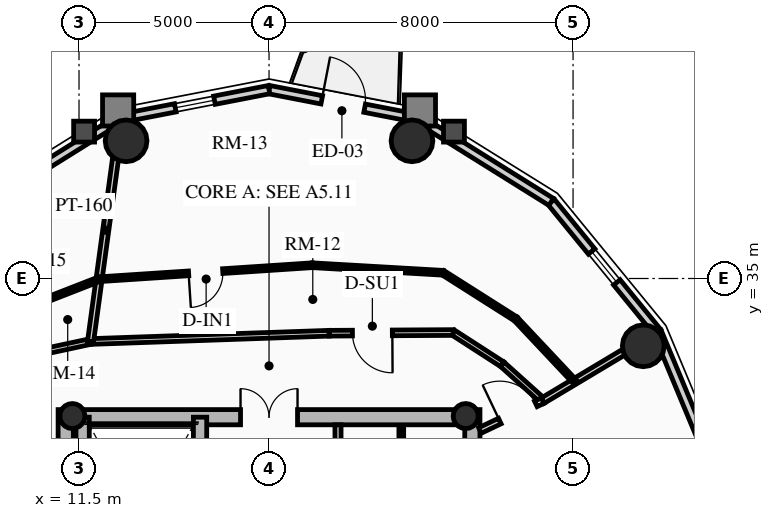
"""IFC4 building model, lengths in metres.
Left out: names, types, materials, properties, quantities, classifications, styles, units other than length and angle.
Written with IfcOpenShell. Run it as: python <this file> out.ifc"""

import sys

from ifc_helpers import new_model, si_unit, direction, frame, frame_2d, origin, origin_2d, place, context, subcontext, project, spatial, rectangle, circle, hollow_circle, extrude, source, transform, mapped, element, fill, save


model = new_model("IFC4")
c1 = context("Model", 3, precision=1e-05, world=origin(), true_north=direction((0.0, 1.0)))
c2 = subcontext(c1, "Body", "Model", "MODEL_VIEW")
j1 = project(units=[si_unit("LENGTHUNIT", "METRE"), si_unit("PLANEANGLEUNIT", "RADIAN")], contexts=[c1])
p1 = place(None, origin())
s1 = spatial("IfcSite", under=j1, at=p1, CompositionType="ELEMENT")
p2 = place(p1, origin())
s2 = spatial("IfcBuilding", under=s1, at=p2, CompositionType="ELEMENT")
p3 = place(p2, frame((0.0, 0.0, 226.05)))
s3 = spatial("IfcBuildingStorey", under=s2, at=p3, CompositionType="ELEMENT", Elevation=226.05)
for number, where, z_axis, x_axis in (
    (1, (11.15, 17.45, 0.0), (0.0, 0.0, 1.0), (0.0, 1.0, 0.0)),
    (2, (21.85, 17.45, 0.0), (0.0, 0.0, 1.0), (0.0, 1.0, 0.0)),
):
    element("IfcWall", number, at=place(p3, frame(where, z_axis=z_axis, x_axis=x_axis)), inside=s3, PredefinedType="SHEAR", context=c2, shape_type="SweptSolid", body=[
        extrude(rectangle(XDim=14.1, YDim=0.4, at=frame_2d((7.05, 0.0))), origin(), (0.0, 0.0, 1.0), 3.2),
    ])
p4 = place(p3, frame((11.15, 31.35, 0.0), z_axis=(0.0, 0.0, 1.0), x_axis=(1.0, 0.0, 0.0)))
e3 = element("IfcWall", 3, at=p4, inside=s3, PredefinedType="SHEAR", context=c2, shape_type="SweptSolid", body=[
    extrude(rectangle(XDim=10.7, YDim=0.4, at=frame_2d((5.35, 0.0))), origin(), (0.0, 0.0, 1.0), 3.2),
])
m1 = source(origin(), c2, "Body", "SweptSolid", [
    extrude(rectangle(XDim=1.5, YDim=2.02, at=frame_2d((0.75, 1.01))), frame((0.0, 0.21, 0.0), z_axis=(0.0, -1.0, 0.0), x_axis=(1.0, 0.0, 0.0)), (0.0, 0.0, 1.0), 0.42),
])
p5 = place(p4, frame((4.6, 0.0, 0.0)))
e4 = element("IfcOpeningElement", 4, at=p5, cuts=e3, PredefinedType="OPENING", context=c2, shape_type="MappedRepresentation", body=[
    mapped(m1, transform((0.0, 0.0, 0.0), x_axis=(1.0, 0.0, 0.0), y_axis=(0.0, 1.0, 0.0), z_axis=(0.0, 0.0, 1.0), scale=1.0)),
])
p6 = place(p3, frame((14.685, 17.65, 0.0), z_axis=(0.0, 0.0, 1.0), x_axis=(0.0, 1.0, 0.0)))
e5 = element("IfcWall", 5, at=p6, inside=s3, PredefinedType="SHEAR", context=c2, shape_type="SweptSolid", body=[
    extrude(rectangle(XDim=13.7, YDim=0.35, at=frame_2d((6.85, 0.0))), origin(), (0.0, 0.0, 1.0), 3.2),
])
m2 = source(origin(), c2, "Body", "SweptSolid", [
    extrude(rectangle(XDim=1.1, YDim=2.015, at=frame_2d((0.55, 1.007))), frame((0.0, 0.185, 0.0), z_axis=(0.0, -1.0, 0.0), x_axis=(1.0, 0.0, 0.0)), (0.0, 0.0, 1.0), 0.37),
])
p7 = place(p6, frame((4.85, 0.0, 0.0)))
e6 = element("IfcOpeningElement", 6, at=p7, cuts=e5, PredefinedType="OPENING", context=c2, shape_type="MappedRepresentation", body=[
    mapped(m2, transform((0.0, 0.0, 0.0), x_axis=(1.0, 0.0, 0.0), y_axis=(0.0, 1.0, 0.0), z_axis=(0.0, 0.0, 1.0), scale=1.0)),
])
p8 = place(p6, frame((0.625, 0.0, 0.0)))
e7 = element("IfcOpeningElement", 7, at=p8, cuts=e5, PredefinedType="OPENING", context=c2, shape_type="MappedRepresentation", body=[
    mapped(m2, transform((0.0, 0.0, 0.0), x_axis=(1.0, 0.0, 0.0), y_axis=(0.0, 1.0, 0.0), z_axis=(0.0, 0.0, 1.0), scale=1.0)),
])
p9 = place(p6, frame((2.625, 0.0, 0.0)))
e8 = element("IfcOpeningElement", 8, at=p9, cuts=e5, PredefinedType="OPENING", context=c2, shape_type="MappedRepresentation", body=[
    mapped(m2, transform((0.0, 0.0, 0.0), x_axis=(1.0, 0.0, 0.0), y_axis=(0.0, 1.0, 0.0), z_axis=(0.0, 0.0, 1.0), scale=1.0)),
])
m3 = source(origin(), c2, "Body", "SweptSolid", [
    extrude(rectangle(XDim=1.15, YDim=2.02, at=frame_2d((0.575, 1.01))), frame((0.0, 0.185, 0.0), z_axis=(0.0, -1.0, 0.0), x_axis=(1.0, 0.0, 0.0)), (0.0, 0.0, 1.0), 0.37),
])
p10 = place(p6, frame((7.27, 0.0, 0.0)))
e9 = element("IfcOpeningElement", 9, at=p10, cuts=e5, PredefinedType="OPENING", context=c2, shape_type="MappedRepresentation", body=[
    mapped(m3, transform((0.0, 0.0, 0.0), x_axis=(1.0, 0.0, 0.0), y_axis=(0.0, 1.0, 0.0), z_axis=(0.0, 0.0, 1.0), scale=1.0)),
])
p11 = place(p3, frame((11.595, 24.655, 0.0), z_axis=(0.0, 0.0, 1.0), x_axis=(0.0, 1.0, 0.0)))
e10 = element("IfcWall", 10, at=p11, inside=s3, PredefinedType="SHEAR", context=c2, shape_type="SweptSolid", body=[
    extrude(rectangle(XDim=6.695, YDim=0.35, at=frame_2d((3.348, 0.0))), origin(), (0.0, 0.0, 1.0), 3.2),
])
for number, where, z_axis, x_axis in (
    (11, (11.325, 31.38, 0.0), (0.0, 0.0, 1.0), (1.0, 0.0, 0.0)),
    (12, (21.675, 31.38, 0.0), (0.0, 0.0, 1.0), (1.0, 0.0, 0.0)),
):
    element("IfcColumn", number, at=place(p3, frame(where, z_axis=z_axis, x_axis=x_axis)), inside=s3, PredefinedType="COLUMN", context=c2, shape_type="SweptSolid", body=[
        extrude(hollow_circle(Radius=0.33, WallThickness=0.025, at=origin_2d()), origin(), (0.0, 0.0, 1.0), 3.2),
    ])
for number, where, z_axis, x_axis in (
    (13, (26.347, 33.229, 0.0), (0.0, 0.0, 1.0), (1.0, 0.0, 0.0)),
    (14, (20.261, 38.623, 0.0), (0.0, 0.0, 1.0), (1.0, 0.0, 0.0)),
    (15, (12.739, 38.623, 0.0), (0.0, 0.0, 1.0), (1.0, 0.0, 0.0)),
):
    element("IfcColumn", number, at=place(p3, frame(where, z_axis=z_axis, x_axis=x_axis)), inside=s3, PredefinedType="USERDEFINED", context=c2, shape_type="SweptSolid", body=[
        extrude(circle(Radius=0.55, at=origin_2d()), origin(), (0.0, 0.0, 1.0), 3.2),
    ])
p12 = place(p3, frame((26.718, 33.593, 0.0), z_axis=(0.0, 0.0, 1.0), x_axis=(0.384036305194, -0.923317993052, 0.0)))
e16 = element("IfcWall", 16, at=p12, inside=s3, PredefinedType="SOLIDWALL", context=c2, shape_type="SweptSolid", body=[
    extrude(rectangle(XDim=4.671, YDim=0.22, at=frame_2d((2.335, 0.0))), origin(), (0.0, 0.0, 1.0), 2.612),
])
p13 = place(p3, frame((23.924, 37.015, 0.0), z_axis=(0.0, 0.0, 1.0), x_axis=(0.632467166636, -0.774587169483, 0.0)))
e17 = element("IfcWall", 17, at=p13, inside=s3, PredefinedType="SOLIDWALL", context=c2, shape_type="SweptSolid", body=[
    extrude(rectangle(XDim=4.418, YDim=0.22, at=frame_2d((2.209, 0.0))), origin(), (0.0, 0.0, 1.0), 2.612),
])
m4 = source(origin(), c2, "Body", "SweptSolid", [
    extrude(rectangle(XDim=1.05, YDim=1.3, at=frame_2d((0.525, 0.65))), frame((0.0, 0.12, 0.0), z_axis=(0.0, -1.0, 0.0), x_axis=(1.0, 0.0, 0.0)), (0.0, 0.0, 1.0), 0.24),
])
p14 = place(p13, frame((1.684, 0.0, 0.65)))
e18 = element("IfcOpeningElement", 18, at=p14, cuts=e17, PredefinedType="OPENING", context=c2, shape_type="MappedRepresentation", body=[
    mapped(m4, transform((0.0, 0.0, 0.0), x_axis=(1.0, 0.0, 0.0), y_axis=(0.0, 1.0, 0.0), z_axis=(0.0, 0.0, 1.0), scale=1.0)),
])
p15 = place(p3, frame((20.403, 39.213, 0.0), z_axis=(0.0, 0.0, 1.0), x_axis=(0.848318713376, -0.529485939886, 0.0)))
e19 = element("IfcWall", 19, at=p15, inside=s3, PredefinedType="SOLIDWALL", context=c2, shape_type="SweptSolid", body=[
    extrude(rectangle(XDim=4.15, YDim=0.22, at=frame_2d((2.075, 0.0))), origin(), (0.0, 0.0, 1.0), 2.612),
])
p16 = place(p3, frame((16.5, 39.97, 0.0), z_axis=(0.0, 0.0, 1.0), x_axis=(0.981700307484, -0.190432419211, 0.0)))
e20 = element("IfcWall", 20, at=p16, inside=s3, PredefinedType="SOLIDWALL", context=c2, shape_type="SweptSolid", body=[
    extrude(rectangle(XDim=3.976, YDim=0.22, at=frame_2d((1.988, 0.0))), origin(), (0.0, 0.0, 1.0), 2.612),
])
m5 = source(origin(), c2, "Body", "SweptSolid", [
    extrude(rectangle(XDim=1.15, YDim=2.005, at=frame_2d((0.575, 1.002))), frame((0.0, 0.12, 0.0), z_axis=(0.0, -1.0, 0.0), x_axis=(1.0, 0.0, 0.0)), (0.0, 0.0, 1.0), 0.24),
])
p17 = place(p16, frame((1.413, 0.0, 0.0)))
e21 = element("IfcOpeningElement", 21, at=p17, cuts=e20, PredefinedType="OPENING", context=c2, shape_type="MappedRepresentation", body=[
    mapped(m5, transform((0.0, 0.0, 0.0), x_axis=(1.0, 0.0, 0.0), y_axis=(0.0, 1.0, 0.0), z_axis=(0.0, 0.0, 1.0), scale=1.0)),
])
p18 = place(p3, frame((12.597, 39.213, 0.0), z_axis=(0.0, 0.0, 1.0), x_axis=(0.981700307484, 0.190432419211, 0.0)))
e22 = element("IfcWall", 22, at=p18, inside=s3, PredefinedType="SOLIDWALL", context=c2, shape_type="SweptSolid", body=[
    extrude(rectangle(XDim=3.976, YDim=0.22, at=frame_2d((1.988, 0.0))), origin(), (0.0, 0.0, 1.0), 2.612),
])
p19 = place(p18, frame((1.463, 0.0, 0.65)))
e23 = element("IfcOpeningElement", 23, at=p19, cuts=e22, PredefinedType="OPENING", context=c2, shape_type="MappedRepresentation", body=[
    mapped(m4, transform((0.0, 0.0, 0.0), x_axis=(1.0, 0.0, 0.0), y_axis=(0.0, 1.0, 0.0), z_axis=(0.0, 0.0, 1.0), scale=1.0)),
])
p20 = place(p3, frame((9.076, 37.015, 0.0), z_axis=(0.0, 0.0, 1.0), x_axis=(0.848318713376, 0.529485939886, 0.0)))
e24 = element("IfcWall", 24, at=p20, inside=s3, PredefinedType="SOLIDWALL", context=c2, shape_type="SweptSolid", body=[
    extrude(rectangle(XDim=4.15, YDim=0.22, at=frame_2d((2.075, 0.0))), origin(), (0.0, 0.0, 1.0), 2.612),
])
p21 = place(p3, frame((18.315, 27.25, 0.0), z_axis=(0.0, 0.0, 1.0), x_axis=(0.0, 1.0, 0.0)))
e25 = element("IfcWall", 25, at=p21, inside=s3, PredefinedType="PARTITIONING", context=c2, shape_type="SweptSolid", body=[
    extrude(rectangle(XDim=3.9, YDim=0.16, at=frame_2d((1.95, 0.0))), origin(), (0.0, 0.0, 1.0), 2.975),
])
m6 = source(origin(), c2, "Body", "SweptSolid", [
    extrude(rectangle(XDim=0.9, YDim=2.005, at=frame_2d((0.45, 1.002))), frame((0.0, 0.09, 0.0), z_axis=(0.0, -1.0, 0.0), x_axis=(1.0, 0.0, 0.0)), (0.0, 0.0, 1.0), 0.18),
])
p22 = place(p21, frame((2.2, 0.0, 0.0)))
e26 = element("IfcOpeningElement", 26, at=p22, cuts=e25, PredefinedType="OPENING", context=c2, shape_type="MappedRepresentation", body=[
    mapped(m6, transform((0.0, 0.0, 0.0), x_axis=(1.0, 0.0, 0.0), y_axis=(0.0, 1.0, 0.0), z_axis=(0.0, 0.0, 1.0), scale=1.0)),
])
p23 = place(p3, frame((19.98, 27.3, 0.0), z_axis=(0.0, 0.0, 1.0), x_axis=(0.0, 1.0, 0.0)))
e27 = element("IfcWall", 27, at=p23, inside=s3, PredefinedType="PARTITIONING", context=c2, shape_type="SweptSolid", body=[
    extrude(rectangle(XDim=3.82, YDim=0.125, at=frame_2d((1.91, 0.0))), origin(), (0.0, 0.0, 1.0), 2.975),
])
m7 = source(origin(), c2, "Body", "SweptSolid", [
    extrude(rectangle(XDim=0.9, YDim=2.005, at=frame_2d((0.45, 1.002))), frame((0.0, 0.073, 0.0), z_axis=(0.0, -1.0, 0.0), x_axis=(1.0, 0.0, 0.0)), (0.0, 0.0, 1.0), 0.145),
])
p24 = place(p23, frame((1.45, 0.0, 0.0)))
e28 = element("IfcOpeningElement", 28, at=p24, cuts=e27, PredefinedType="OPENING", context=c2, shape_type="MappedRepresentation", body=[
    mapped(m7, transform((0.0, 0.0, 0.0), x_axis=(1.0, 0.0, 0.0), y_axis=(0.0, 1.0, 0.0), z_axis=(0.0, 0.0, 1.0), scale=1.0)),
])
p25 = place(p3, frame((23.701, 31.786, 0.0), z_axis=(0.0, 0.0, 1.0), x_axis=(-0.743742806382, 0.668465883913, 0.0)))
e29 = element("IfcWall", 29, at=p25, inside=s3, PredefinedType="PARTITIONING", context=c2, shape_type="SweptSolid", body=[
    extrude(rectangle(XDim=1.434, YDim=0.15, at=frame_2d((0.717, 0.0))), origin(), (0.0, 0.0, 1.0), 2.612),
])
p26 = place(p3, frame((22.635, 32.744, 0.0), z_axis=(0.0, 0.0, 1.0), x_axis=(-0.840119270642, 0.542401706391, 0.0)))
e30 = element("IfcWall", 30, at=p26, inside=s3, PredefinedType="PARTITIONING", context=c2, shape_type="SweptSolid", body=[
    extrude(rectangle(XDim=1.538, YDim=0.15, at=frame_2d((0.769, 0.0))), origin(), (0.0, 0.0, 1.0), 2.545),
])
p27 = place(p3, frame((21.344, 33.578, 0.0), z_axis=(0.0, 0.0, 1.0), x_axis=(-0.999984243152, -0.005613684, 0.0)))
e31 = element("IfcWall", 31, at=p27, inside=s3, PredefinedType="PARTITIONING", context=c2, shape_type="SweptSolid", body=[
    extrude(rectangle(XDim=3.262, YDim=0.15, at=frame_2d((1.631, 0.0))), origin(), (0.0, 0.0, 1.0), 2.612),
])
m8 = source(origin(), c2, "Body", "SweptSolid", [
    extrude(rectangle(XDim=1.05, YDim=2.015, at=frame_2d((0.525, 1.007))), frame((0.0, 0.085, 0.0), z_axis=(0.0, -1.0, 0.0), x_axis=(1.0, 0.0, 0.0)), (0.0, 0.0, 1.0), 0.17),
])
p28 = place(p27, frame((1.599, 0.0, 0.0)))
e32 = element("IfcOpeningElement", 32, at=p28, cuts=e31, PredefinedType="OPENING", context=c2, shape_type="MappedRepresentation", body=[
    mapped(m8, transform((0.0, 0.0, 0.0), x_axis=(1.0, 0.0, 0.0), y_axis=(0.0, 1.0, 0.0), z_axis=(0.0, 0.0, 1.0), scale=1.0)),
])
p29 = place(p3, frame((18.082, 33.56, 0.0), z_axis=(0.0, 0.0, 1.0), x_axis=(-0.999399009709, -0.034664382185, 0.0)))
e33 = element("IfcWall", 33, at=p29, inside=s3, PredefinedType="PARTITIONING", context=c2, shape_type="SweptSolid", body=[
    extrude(rectangle(XDim=6.282, YDim=0.15, at=frame_2d((3.141, 0.0))), origin(), (0.0, 0.0, 1.0), 2.545),
])
p30 = place(p3, frame((11.803, 33.342, 0.0), z_axis=(0.0, 0.0, 1.0), x_axis=(-0.977750742783, -0.209770076483, 0.0)))
e34 = element("IfcWall", 34, at=p30, inside=s3, PredefinedType="PARTITIONING", context=c2, shape_type="SweptSolid", body=[
    extrude(rectangle(XDim=1.868, YDim=0.15, at=frame_2d((0.934, 0.0))), origin(), (0.0, 0.0, 1.0), 2.545),
])
p31 = place(p3, frame((23.701, 31.786, 0.0), z_axis=(0.0, 0.0, 1.0), x_axis=(0.858059206709, 0.513550774298, 0.0)))
e35 = element("IfcWall", 35, at=p31, inside=s3, PredefinedType="PARTITIONING", context=c2, shape_type="SweptSolid", body=[
    extrude(rectangle(XDim=3.497, YDim=0.16, at=frame_2d((1.748, 0.0))), origin(), (0.0, 0.0, 1.0), 2.612),
])
p32 = place(p3, frame((11.803, 33.342, 0.0), z_axis=(0.0, 0.0, 1.0), x_axis=(0.135452591041, 0.990783828885, 0.0)))
e36 = element("IfcWall", 36, at=p32, inside=s3, PredefinedType="PARTITIONING", context=c2, shape_type="SweptSolid", body=[
    extrude(rectangle(XDim=5.906, YDim=0.16, at=frame_2d((2.953, 0.0))), origin(), (0.0, 0.0, 1.0), 2.612),
])
p33 = place(p3, frame((22.05, 31.0, 0.0), z_axis=(0.0, 0.0, 1.0), x_axis=(0.903013459407, 0.429612257891, 0.0)))
e37 = element("IfcWall", 37, at=p33, inside=s3, PredefinedType="PARTITIONING", context=c2, shape_type="SweptSolid", body=[
    extrude(rectangle(XDim=1.829, YDim=0.16, at=frame_2d((0.914, 0.0))), origin(), (0.0, 0.0, 1.0), 2.545),
])
m9 = source(origin(), c2, "Body", "SweptSolid", [
    extrude(rectangle(XDim=1.05, YDim=2.015, at=frame_2d((0.525, 1.007))), frame((0.0, 0.09, 0.0), z_axis=(0.0, -1.0, 0.0), x_axis=(1.0, 0.0, 0.0)), (0.0, 0.0, 1.0), 0.18),
])
p34 = place(p33, frame((0.579, 0.0, 0.0)))
e38 = element("IfcOpeningElement", 38, at=p34, cuts=e37, PredefinedType="OPENING", context=c2, shape_type="MappedRepresentation", body=[
    mapped(m9, transform((0.0, 0.0, 0.0), x_axis=(1.0, 0.0, 0.0), y_axis=(0.0, 1.0, 0.0), z_axis=(0.0, 0.0, 1.0), scale=1.0)),
])
p35 = place(p3, frame((24.542, 32.288, 0.0), z_axis=(0.0, 0.0, 1.0), x_axis=(-0.68501091047, 0.72853280814, 0.0)))
e39 = element("IfcWall", 39, at=p35, inside=s3, PredefinedType="PARTITIONING", context=c2, shape_type="SweptSolid", body=[
    extrude(rectangle(XDim=2.261, YDim=0.125, at=frame_2d((1.13, 0.0))), origin(), (0.0, 0.0, 1.0), 2.612),
])
p36 = place(p3, frame((22.993, 33.935, 0.0), z_axis=(0.0, 0.0, 1.0), x_axis=(-0.844312558894, 0.535851008112, 0.0)))
e40 = element("IfcWall", 40, at=p36, inside=s3, PredefinedType="PARTITIONING", context=c2, shape_type="SweptSolid", body=[
    extrude(rectangle(XDim=2.268, YDim=0.125, at=frame_2d((1.134, 0.0))), origin(), (0.0, 0.0, 1.0), 2.545),
])
p37 = place(p3, frame((21.078, 35.15, 0.0), z_axis=(0.0, 0.0, 1.0), x_axis=(-0.99833900121, 0.057612834184, 0.0)))
e41 = element("IfcWall", 41, at=p37, inside=s3, PredefinedType="PARTITIONING", context=c2, shape_type="SweptSolid", body=[
    extrude(rectangle(XDim=3.445, YDim=0.125, at=frame_2d((1.723, 0.0))), origin(), (0.0, 0.0, 1.0), 2.612),
])
p38 = place(p3, frame((17.639, 35.349, 0.0), z_axis=(0.0, 0.0, 1.0), x_axis=(-0.997849042159, -0.065553711275, 0.0)))
e42 = element("IfcWall", 42, at=p38, inside=s3, PredefinedType="PARTITIONING", context=c2, shape_type="SweptSolid", body=[
    extrude(rectangle(XDim=5.624, YDim=0.125, at=frame_2d((2.812, 0.0))), origin(), (0.0, 0.0, 1.0), 2.545),
])
p39 = place(p38, frame((2.362, 0.0, 0.0)))
e43 = element("IfcOpeningElement", 43, at=p39, cuts=e42, PredefinedType="OPENING", context=c2, shape_type="MappedRepresentation", body=[
    mapped(m7, transform((0.0, 0.0, 0.0), x_axis=(1.0, 0.0, 0.0), y_axis=(0.0, 1.0, 0.0), z_axis=(0.0, 0.0, 1.0), scale=1.0)),
])
p40 = place(p3, frame((12.027, 34.98, 0.0), z_axis=(0.0, 0.0, 1.0), x_axis=(-0.931701760683, -0.363224213317, 0.0)))
e44 = element("IfcWall", 44, at=p40, inside=s3, PredefinedType="PARTITIONING", context=c2, shape_type="SweptSolid", body=[
    extrude(rectangle(XDim=2.468, YDim=0.125, at=frame_2d((1.234, 0.0))), origin(), (0.0, 0.0, 1.0), 2.545),
])
m10 = source(origin(), c2, "Body", "SweptSolid", [
    extrude(rectangle(XDim=1.05, YDim=1.3, at=frame_2d((0.525, 0.65))), frame((0.0, 0.03, 0.0), z_axis=(0.0, -1.0, 0.0), x_axis=(1.0, 0.0, 0.0)), (0.0, 0.0, 1.0), 0.06),
])
p41 = place(p14, origin())
e45 = element("IfcWindow", 45, at=p41, inside=s3, PartitioningType="SINGLE_PANEL", PredefinedType="WINDOW", context=c2, shape_type="MappedRepresentation", body=[
    mapped(m10, transform((0.0, 0.0, 0.0), x_axis=(1.0, 0.0, 0.0), y_axis=(0.0, 1.0, 0.0), z_axis=(0.0, 0.0, 1.0), scale=1.0)),
])
fill(e18, e45)
m11 = source(origin(), c2, "Body", "SweptSolid", [
    extrude(rectangle(XDim=1.15, YDim=2.005, at=frame_2d((0.575, 1.002))), frame((0.0, 0.025, 0.0), z_axis=(0.0, -1.0, 0.0), x_axis=(1.0, 0.0, 0.0)), (0.0, 0.0, 1.0), 0.05),
])
p42 = place(p17, origin())
e46 = element("IfcDoor", 46, at=p42, inside=s3, OperationType="SINGLE_SWING_LEFT", PredefinedType="DOOR", context=c2, shape_type="MappedRepresentation", body=[
    mapped(m11, transform((0.0, 0.0, 0.0), x_axis=(1.0, 0.0, 0.0), y_axis=(0.0, 1.0, 0.0), z_axis=(0.0, 0.0, 1.0), scale=1.0)),
])
fill(e21, e46)
p43 = place(p19, origin())
e47 = element("IfcWindow", 47, at=p43, inside=s3, PartitioningType="SINGLE_PANEL", PredefinedType="WINDOW", context=c2, shape_type="MappedRepresentation", body=[
    mapped(m10, transform((0.0, 0.0, 0.0), x_axis=(1.0, 0.0, 0.0), y_axis=(0.0, 1.0, 0.0), z_axis=(0.0, 0.0, 1.0), scale=1.0)),
])
fill(e23, e47)
m12 = source(origin(), c2, "Body", "SweptSolid", [
    extrude(rectangle(XDim=1.5, YDim=2.02, at=frame_2d((0.75, 1.01))), frame((0.0, 0.025, 0.0), z_axis=(0.0, -1.0, 0.0), x_axis=(1.0, 0.0, 0.0)), (0.0, 0.0, 1.0), 0.05),
])
p44 = place(p5, origin())
e48 = element("IfcDoor", 48, at=p44, inside=s3, OperationType="DOUBLE_DOOR_SINGLE_SWING", PredefinedType="DOOR", context=c2, shape_type="MappedRepresentation", body=[
    mapped(m12, transform((0.0, 0.0, 0.0), x_axis=(1.0, 0.0, 0.0), y_axis=(0.0, 1.0, 0.0), z_axis=(0.0, 0.0, 1.0), scale=1.0)),
])
fill(e4, e48)
m13 = source(origin(), c2, "Body", "SweptSolid", [
    extrude(rectangle(XDim=1.05, YDim=2.015, at=frame_2d((0.525, 1.007))), frame((0.0, 0.025, 0.0), z_axis=(0.0, -1.0, 0.0), x_axis=(1.0, 0.0, 0.0)), (0.0, 0.0, 1.0), 0.05),
])
p45 = place(p34, origin())
e49 = element("IfcDoor", 49, at=p45, inside=s3, OperationType="SINGLE_SWING_LEFT", PredefinedType="DOOR", context=c2, shape_type="MappedRepresentation", body=[
    mapped(m13, transform((0.0, 0.0, 0.0), x_axis=(1.0, 0.0, 0.0), y_axis=(0.0, 1.0, 0.0), z_axis=(0.0, 0.0, 1.0), scale=1.0)),
])
fill(e38, e49)
p46 = place(p28, origin())
e50 = element("IfcDoor", 50, at=p46, inside=s3, OperationType="SINGLE_SWING_LEFT", PredefinedType="DOOR", context=c2, shape_type="MappedRepresentation", body=[
    mapped(m13, transform((0.0, 0.0, 0.0), x_axis=(1.0, 0.0, 0.0), y_axis=(0.0, 1.0, 0.0), z_axis=(0.0, 0.0, 1.0), scale=1.0)),
])
fill(e32, e50)
m14 = source(origin(), c2, "Body", "SweptSolid", [
    extrude(rectangle(XDim=0.9, YDim=2.005, at=frame_2d((0.45, 1.002))), frame((0.0, 0.025, 0.0), z_axis=(0.0, -1.0, 0.0), x_axis=(1.0, 0.0, 0.0)), (0.0, 0.0, 1.0), 0.05),
])
p47 = place(p39, origin())
e51 = element("IfcDoor", 51, at=p47, inside=s3, OperationType="SINGLE_SWING_RIGHT", PredefinedType="DOOR", context=c2, shape_type="MappedRepresentation", body=[
    mapped(m14, transform((0.0, 0.0, 0.0), x_axis=(1.0, 0.0, 0.0), y_axis=(0.0, 1.0, 0.0), z_axis=(0.0, 0.0, 1.0), scale=1.0)),
])
fill(e43, e51)
save(model, sys.argv[1])
